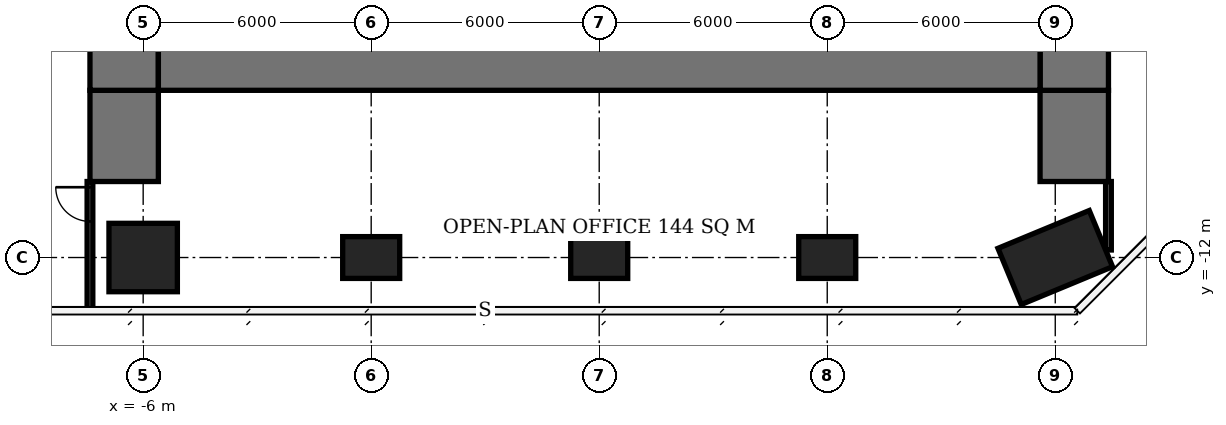
"""IFC4 building model, lengths in metres.
Left out: names, types, materials, properties, quantities, classifications, styles, units other than length and angle.
Written with IfcOpenShell. Run it as: python <this file> out.ifc"""

import sys

from ifc_helpers import new_model, si_unit, direction, frame, frame_2d, origin, origin_2d, place, context, subcontext, project, spatial, rectangle, extrude, element, fill, save


model = new_model("IFC4")
c1 = context("Model", 3, precision=1e-05, world=origin(), true_north=direction((0.0, 1.0)))
c2 = subcontext(c1, "Body", "Model", "MODEL_VIEW")
j1 = project(units=[si_unit("LENGTHUNIT", "METRE"), si_unit("PLANEANGLEUNIT", "RADIAN")], contexts=[c1])
p1 = place(None, origin())
s1 = spatial("IfcSite", under=j1, at=p1, CompositionType="ELEMENT")
p2 = place(p1, origin())
s2 = spatial("IfcBuilding", under=s1, at=p2, CompositionType="ELEMENT")
p3 = place(p2, frame((0.0, 0.0, 196.7)))
s3 = spatial("IfcBuildingStorey", under=s2, at=p3, CompositionType="ELEMENT", Elevation=196.7)
p4 = place(p3, frame((-6.0, -12.0, 0.0), z_axis=(0.0, 0.0, 1.0), x_axis=(1.0, 0.0, 0.0)))
e1 = element("IfcColumn", 1, at=p4, inside=s3, PredefinedType="COLUMN", context=c2, shape_type="SweptSolid", body=[
    extrude(rectangle(XDim=1.8, YDim=1.8, at=origin_2d()), origin(), (0.0, 0.0, 1.0), 3.9),
])
for number, where, z_axis, x_axis in (
    (2, (0.0, -12.0, 0.0), (0.0, 0.0, 1.0), (1.0, 0.0, 0.0)),
    (3, (6.0, -12.0, 0.0), (0.0, 0.0, 1.0), (1.0, 0.0, 0.0)),
    (4, (12.0, -12.0, 0.0), (0.0, 0.0, 1.0), (1.0, 0.0, 0.0)),
):
    element("IfcColumn", number, at=place(p3, frame(where, z_axis=z_axis, x_axis=x_axis)), inside=s3, PredefinedType="COLUMN", context=c2, shape_type="SweptSolid", body=[
        extrude(rectangle(XDim=1.5, YDim=1.1, at=origin_2d()), origin(), (0.0, 0.0, 1.0), 3.9),
    ])
p5 = place(p3, frame((18.0, -12.0, 0.0), z_axis=(0.0, 0.0, 1.0), x_axis=(-0.923879532511, -0.382683432365, 0.0)))
e5 = element("IfcColumn", 5, at=p5, inside=s3, PredefinedType="COLUMN", context=c2, shape_type="SweptSolid", body=[
    extrude(rectangle(XDim=2.6, YDim=1.6, at=origin_2d()), origin(), (0.0, 0.0, 1.0), 3.9),
])
p6 = place(p3, frame((-5.6, -6.6, 0.0), z_axis=(0.0, 0.0, 1.0), x_axis=(1.0, 0.0, 0.0)))
e6 = element("IfcWall", 6, at=p6, inside=s3, PredefinedType="SHEAR", context=c2, shape_type="SweptSolid", body=[
    extrude(rectangle(XDim=23.2, YDim=2.0, at=frame_2d((11.6, 0.0))), origin(), (0.0, 0.0, 1.0), 3.9),
])
p7 = place(p3, frame((-6.5, -7.6, 0.0), z_axis=(0.0, 0.0, 1.0), x_axis=(0.0, 1.0, 0.0)))
e7 = element("IfcWall", 7, at=p7, inside=s3, PredefinedType="SHEAR", context=c2, shape_type="SweptSolid", body=[
    extrude(rectangle(XDim=21.2, YDim=1.8, at=frame_2d((10.6, 0.0))), origin(), (0.0, 0.0, 1.0), 3.9),
])
p8 = place(p7, frame((7.8, 0.0, 0.0)))
e8 = element("IfcOpeningElement", 8, at=p8, cuts=e7, PredefinedType="OPENING", context=c2, shape_type="SweptSolid", body=[
    extrude(rectangle(XDim=1.8, YDim=2.4, at=frame_2d((0.9, 1.2))), frame((0.0, 0.91, 0.0), z_axis=(0.0, -1.0, 0.0), x_axis=(1.0, 0.0, 0.0)), (0.0, 0.0, 1.0), 1.82),
])
p9 = place(p3, frame((18.5, -7.6, 0.0), z_axis=(0.0, 0.0, 1.0), x_axis=(0.0, 1.0, 0.0)))
e9 = element("IfcWall", 9, at=p9, inside=s3, PredefinedType="SHEAR", context=c2, shape_type="SweptSolid", body=[
    extrude(rectangle(XDim=21.2, YDim=1.8, at=frame_2d((10.6, 0.0))), origin(), (0.0, 0.0, 1.0), 3.9),
])
p10 = place(p9, frame((9.2, 0.0, 0.0)))
e10 = element("IfcOpeningElement", 10, at=p10, cuts=e9, PredefinedType="OPENING", context=c2, shape_type="SweptSolid", body=[
    extrude(rectangle(XDim=1.8, YDim=2.4, at=frame_2d((0.9, 1.2))), frame((0.0, 0.91, 0.0), z_axis=(0.0, -1.0, 0.0), x_axis=(1.0, 0.0, 0.0)), (0.0, 0.0, 1.0), 1.82),
])
for number, where, z_axis, x_axis in (
    (11, (-6.5, -10.0, 0.0), (0.0, 0.0, 1.0), (0.0, 1.0, 0.0)),
    (12, (18.5, -10.0, 0.0), (0.0, 0.0, 1.0), (0.0, 1.0, 0.0)),
):
    element("IfcWall", number, at=place(p3, frame(where, z_axis=z_axis, x_axis=x_axis)), inside=s3, PredefinedType="SHEAR", context=c2, shape_type="SweptSolid", body=[
        extrude(rectangle(XDim=2.4, YDim=1.8, at=frame_2d((1.2, 0.0))), origin(), (0.0, 0.0, 1.0), 3.9),
    ])
p11 = place(p3, frame((-7.4, -13.4, 0.0), z_axis=(0.0, 0.0, 1.0), x_axis=(0.0, 1.0, 0.0)))
e13 = element("IfcWall", 13, at=p11, inside=s3, PredefinedType="PARTITIONING", context=c2, shape_type="SweptSolid", body=[
    extrude(rectangle(XDim=3.4, YDim=0.15, at=frame_2d((1.7, 0.0))), origin(), (0.0, 0.0, 1.0), 3.65),
])
p12 = place(p11, frame((2.35, 0.0, 0.0)))
e14 = element("IfcOpeningElement", 14, at=p12, cuts=e13, PredefinedType="OPENING", context=c2, shape_type="SweptSolid", body=[
    extrude(rectangle(XDim=0.9, YDim=2.1, at=frame_2d((0.45, 1.05))), frame((0.0, 0.085, 0.0), z_axis=(0.0, -1.0, 0.0), x_axis=(1.0, 0.0, 0.0)), (0.0, 0.0, 1.0), 0.17),
])
p13 = place(p3, frame((19.4, -11.802, 0.0), z_axis=(0.0, 0.0, 1.0), x_axis=(0.0, 1.0, 0.0)))
e15 = element("IfcWall", 15, at=p13, inside=s3, PredefinedType="PARTITIONING", context=c2, shape_type="SweptSolid", body=[
    extrude(rectangle(XDim=1.802, YDim=0.15, at=frame_2d((0.901, 0.0))), origin(), (0.0, 0.0, 1.0), 3.65),
])
p14 = place(p12, origin())
e16 = element("IfcDoor", 16, at=p14, inside=s3, OperationType="SINGLE_SWING_RIGHT", PredefinedType="DOOR", context=c2, shape_type="SweptSolid", body=[
    extrude(rectangle(XDim=0.9, YDim=2.1, at=frame_2d((0.45, 1.05))), frame((0.0, 0.025, 0.0), z_axis=(0.0, -1.0, 0.0), x_axis=(1.0, 0.0, 0.0)), (0.0, 0.0, 1.0), 0.05),
])
fill(e14, e16)
save(model, sys.argv[1])
